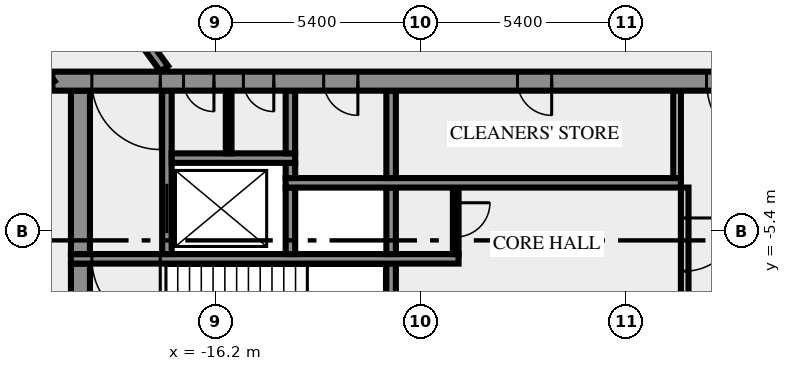
"""IFC4 building model, lengths in metres.
Left out: names, types, materials, properties, quantities, classifications, styles, units other than length and angle.
Written with IfcOpenShell. Run it as: python <this file> out.ifc"""

import sys

from ifc_helpers import new_model, si_unit, direction, frame, frame_2d, origin, place, context, subcontext, project, spatial, rectangle, extrude, element, fill, save


model = new_model("IFC4")
c1 = context("Model", 3, precision=1e-05, world=origin(), true_north=direction((0.0, 1.0)))
c2 = subcontext(c1, "Body", "Model", "MODEL_VIEW")
j1 = project(units=[si_unit("LENGTHUNIT", "METRE"), si_unit("PLANEANGLEUNIT", "RADIAN")], contexts=[c1])
p1 = place(None, origin())
s1 = spatial("IfcSite", under=j1, at=p1, CompositionType="ELEMENT")
p2 = place(p1, origin())
s2 = spatial("IfcBuilding", under=s1, at=p2, CompositionType="ELEMENT")
p3 = place(p2, frame((0.0, 0.0, 172.0)))
s3 = spatial("IfcBuildingStorey", under=s2, at=p3, CompositionType="ELEMENT", Elevation=172.0)
p4 = place(p3, frame((-19.75, -10.5, 0.0), z_axis=(0.0, 0.0, 1.0), x_axis=(0.0, 1.0, 0.0)))
e1 = element("IfcWall", 1, at=p4, inside=s3, PredefinedType="SHEAR", context=c2, shape_type="SweptSolid", body=[
    extrude(rectangle(XDim=4.25, YDim=0.5, at=frame_2d((2.125, 0.0))), origin(), (0.0, 0.0, 1.0), 3.65),
])
p5 = place(p3, frame((-11.575, -7.25, 0.0), z_axis=(0.0, 0.0, 1.0), x_axis=(0.0, 1.0, 0.0)))
e2 = element("IfcWall", 2, at=p5, inside=s3, PredefinedType="SHEAR", context=c2, shape_type="SweptSolid", body=[
    extrude(rectangle(XDim=1.0, YDim=0.25, at=frame_2d((0.5, 0.0))), origin(), (0.0, 0.0, 1.0), 3.65),
])
p6 = place(p3, frame((-3.85, -4.25, 0.0), z_axis=(0.0, 0.0, 1.0), x_axis=(0.0, -1.0, 0.0)))
e3 = element("IfcWall", 3, at=p6, inside=s3, PredefinedType="SOLIDWALL", context=c2, shape_type="SweptSolid", body=[
    extrude(rectangle(XDim=3.0, YDim=0.2, at=frame_2d((1.5, 0.0))), origin(), (0.0, 0.0, 1.0), 3.65),
])
p7 = place(p6, frame((0.8, 0.0, 0.0)))
e4 = element("IfcOpeningElement", 4, at=p7, cuts=e3, PredefinedType="OPENING", context=c2, shape_type="SweptSolid", body=[
    extrude(rectangle(XDim=1.4, YDim=2.1, at=frame_2d((0.7, 1.05))), frame((0.0, 0.11, 0.0), z_axis=(0.0, -1.0, 0.0), x_axis=(1.0, 0.0, 0.0)), (0.0, 0.0, 1.0), 0.22),
])
p8 = place(p3, frame((-9.8, -6.125, 0.0), z_axis=(0.0, 0.0, 1.0), x_axis=(-1.0, 0.0, 0.0)))
e5 = element("IfcWall", 5, at=p8, inside=s3, PredefinedType="SHEAR", context=c2, shape_type="SweptSolid", body=[
    extrude(rectangle(XDim=10.2, YDim=0.25, at=frame_2d((5.1, 0.0))), origin(), (0.0, 0.0, 1.0), 3.65),
])
p9 = place(p8, frame((7.85, 0.0, 0.0)))
e6 = element("IfcOpeningElement", 6, at=p9, cuts=e5, PredefinedType="OPENING", context=c2, shape_type="SweptSolid", body=[
    extrude(rectangle(XDim=1.8, YDim=2.1, at=frame_2d((0.9, 1.05))), frame((0.0, 0.135, 0.0), z_axis=(0.0, -1.0, 0.0), x_axis=(1.0, 0.0, 0.0)), (0.0, 0.0, 1.0), 0.27),
])
p10 = place(p3, frame((-19.75, -6.0, 0.0), z_axis=(0.0, 0.0, 1.0), x_axis=(0.0, 1.0, 0.0)))
e7 = element("IfcWall", 7, at=p10, inside=s3, PredefinedType="SHEAR", context=c2, shape_type="SweptSolid", body=[
    extrude(rectangle(XDim=4.3, YDim=0.5, at=frame_2d((2.15, 0.0))), origin(), (0.0, 0.0, 1.0), 3.65),
])
p11 = place(p3, frame((-17.475, -6.0, 0.0), z_axis=(0.0, 0.0, 1.0), x_axis=(0.0, 1.0, 0.0)))
e8 = element("IfcWall", 8, at=p11, inside=s3, PredefinedType="SHEAR", context=c2, shape_type="SweptSolid", body=[
    extrude(rectangle(XDim=4.3, YDim=0.25, at=frame_2d((2.15, 0.0))), origin(), (0.0, 0.0, 1.0), 3.65),
])
p12 = place(p11, frame((0.55, 0.0, 0.0)))
e9 = element("IfcOpeningElement", 9, at=p12, cuts=e8, PredefinedType="OPENING", context=c2, shape_type="SweptSolid", body=[
    extrude(rectangle(XDim=1.3, YDim=2.1, at=frame_2d((0.65, 1.05))), frame((0.0, 0.135, 0.0), z_axis=(0.0, -1.0, 0.0), x_axis=(1.0, 0.0, 0.0)), (0.0, 0.0, 1.0), 0.27),
])
for number, where, z_axis, x_axis in (
    (10, (-14.225, -6.0, 0.0), (0.0, 0.0, 1.0), (0.0, 1.0, 0.0)),
    (11, (-11.575, -6.0, 0.0), (0.0, 0.0, 1.0), (0.0, 1.0, 0.0)),
):
    element("IfcWall", number, at=place(p3, frame(where, z_axis=z_axis, x_axis=x_axis)), inside=s3, PredefinedType="SHEAR", context=c2, shape_type="SweptSolid", body=[
        extrude(rectangle(XDim=1.75, YDim=0.25, at=frame_2d((0.875, 0.0))), origin(), (0.0, 0.0, 1.0), 3.65),
    ])
p13 = place(p3, frame((-9.875, -4.25, 0.0), z_axis=(0.0, 0.0, 1.0), x_axis=(0.0, -1.0, 0.0)))
e12 = element("IfcWall", 12, at=p13, inside=s3, PredefinedType="PARTITIONING", context=c2, shape_type="SweptSolid", body=[
    extrude(rectangle(XDim=1.75, YDim=0.15, at=frame_2d((0.875, 0.0))), origin(), (0.0, 0.0, 1.0), 3.65),
])
p14 = place(p13, frame((0.4, 0.0, 0.0)))
e13 = element("IfcOpeningElement", 13, at=p14, cuts=e12, PredefinedType="OPENING", context=c2, shape_type="SweptSolid", body=[
    extrude(rectangle(XDim=0.9, YDim=2.1, at=frame_2d((0.45, 1.05))), frame((0.0, 0.085, 0.0), z_axis=(0.0, -1.0, 0.0), x_axis=(1.0, 0.0, 0.0)), (0.0, 0.0, 1.0), 0.17),
])
p15 = place(p3, frame((-14.35, -4.125, 0.0), z_axis=(0.0, 0.0, 1.0), x_axis=(1.0, 0.0, 0.0)))
e14 = element("IfcWall", 14, at=p15, inside=s3, PredefinedType="SHEAR", context=c2, shape_type="SweptSolid", body=[
    extrude(rectangle(XDim=10.4, YDim=0.25, at=frame_2d((5.2, 0.0))), origin(), (0.0, 0.0, 1.0), 3.65),
])
p16 = place(p3, frame((-14.225, -4.0, 0.0), z_axis=(0.0, 0.0, 1.0), x_axis=(0.0, 1.0, 0.0)))
e15 = element("IfcWall", 15, at=p16, inside=s3, PredefinedType="SHEAR", context=c2, shape_type="SweptSolid", body=[
    extrude(rectangle(XDim=0.4, YDim=0.25, at=frame_2d((0.2, 0.0))), origin(), (0.0, 0.0, 1.0), 3.65),
])
p17 = place(p3, frame((-11.575, -4.0, 0.0), z_axis=(0.0, 0.0, 1.0), x_axis=(0.0, 1.0, 0.0)))
e16 = element("IfcWall", 16, at=p17, inside=s3, PredefinedType="SHEAR", context=c2, shape_type="SweptSolid", body=[
    extrude(rectangle(XDim=2.3, YDim=0.25, at=frame_2d((1.15, 0.0))), origin(), (0.0, 0.0, 1.0), 3.65),
])
p18 = place(p3, frame((-4.05, -4.0, 0.0), z_axis=(0.0, 0.0, 1.0), x_axis=(0.0, 1.0, 0.0)))
e17 = element("IfcWall", 17, at=p18, inside=s3, PredefinedType="SOLIDWALL", context=c2, shape_type="SweptSolid", body=[
    extrude(rectangle(XDim=2.3, YDim=0.2, at=frame_2d((1.15, 0.0))), origin(), (0.0, 0.0, 1.0), 3.65),
])
p19 = place(p3, frame((-17.35, -3.475, 0.0), z_axis=(0.0, 0.0, 1.0), x_axis=(1.0, 0.0, 0.0)))
e18 = element("IfcWall", 18, at=p19, inside=s3, PredefinedType="SHEAR", context=c2, shape_type="SweptSolid", body=[
    extrude(rectangle(XDim=3.25, YDim=0.25, at=frame_2d((1.625, 0.0))), origin(), (0.0, 0.0, 1.0), 3.65),
])
p20 = place(p3, frame((-15.85, -3.35, 0.0), z_axis=(0.0, 0.0, 1.0), x_axis=(0.0, 1.0, 0.0)))
e19 = element("IfcWall", 19, at=p20, inside=s3, PredefinedType="PARTITIONING", context=c2, shape_type="SweptSolid", body=[
    extrude(rectangle(XDim=1.65, YDim=0.15, at=frame_2d((0.825, 0.0))), origin(), (0.0, 0.0, 1.0), 3.65),
])
p21 = place(p3, frame((-14.225, -3.35, 0.0), z_axis=(0.0, 0.0, 1.0), x_axis=(0.0, 1.0, 0.0)))
e20 = element("IfcWall", 20, at=p21, inside=s3, PredefinedType="SHEAR", context=c2, shape_type="SweptSolid", body=[
    extrude(rectangle(XDim=1.65, YDim=0.25, at=frame_2d((0.825, 0.0))), origin(), (0.0, 0.0, 1.0), 3.65),
])
p22 = place(p3, frame((20.49, -1.45, 0.0), z_axis=(0.0, 0.0, 1.0), x_axis=(-1.0, 0.0, 0.0)))
e21 = element("IfcWall", 21, at=p22, inside=s3, PredefinedType="SHEAR", context=c2, shape_type="SweptSolid", body=[
    extrude(rectangle(XDim=40.98, YDim=0.5, at=frame_2d((20.49, 0.0))), origin(), (0.0, 0.0, 1.0), 3.65),
])
p23 = place(p22, frame((38.14, 0.0, 0.0)))
e22 = element("IfcOpeningElement", 22, at=p23, cuts=e21, PredefinedType="OPENING", context=c2, shape_type="SweptSolid", body=[
    extrude(rectangle(XDim=1.8, YDim=2.1, at=frame_2d((0.9, 1.05))), frame((0.0, 0.26, 0.0), z_axis=(0.0, -1.0, 0.0), x_axis=(1.0, 0.0, 0.0)), (0.0, 0.0, 1.0), 0.52),
])
p24 = place(p22, frame((36.728, 0.0, 0.0)))
e23 = element("IfcOpeningElement", 23, at=p24, cuts=e21, PredefinedType="OPENING", context=c2, shape_type="SweptSolid", body=[
    extrude(rectangle(XDim=0.8, YDim=2.1, at=frame_2d((0.4, 1.05))), frame((0.0, 0.26, 0.0), z_axis=(0.0, -1.0, 0.0), x_axis=(1.0, 0.0, 0.0)), (0.0, 0.0, 1.0), 0.52),
])
p25 = place(p22, frame((35.153, 0.0, 0.0)))
e24 = element("IfcOpeningElement", 24, at=p25, cuts=e21, PredefinedType="OPENING", context=c2, shape_type="SweptSolid", body=[
    extrude(rectangle(XDim=0.8, YDim=2.1, at=frame_2d((0.4, 1.05))), frame((0.0, 0.26, 0.0), z_axis=(0.0, -1.0, 0.0), x_axis=(1.0, 0.0, 0.0)), (0.0, 0.0, 1.0), 0.52),
])
p26 = place(p22, frame((32.94, 0.0, 0.0)))
e25 = element("IfcOpeningElement", 25, at=p26, cuts=e21, PredefinedType="OPENING", context=c2, shape_type="SweptSolid", body=[
    extrude(rectangle(XDim=0.9, YDim=2.1, at=frame_2d((0.45, 1.05))), frame((0.0, 0.26, 0.0), z_axis=(0.0, -1.0, 0.0), x_axis=(1.0, 0.0, 0.0)), (0.0, 0.0, 1.0), 0.52),
])
p27 = place(p22, frame((27.84, 0.0, 0.0)))
e26 = element("IfcOpeningElement", 26, at=p27, cuts=e21, PredefinedType="OPENING", context=c2, shape_type="SweptSolid", body=[
    extrude(rectangle(XDim=0.9, YDim=2.1, at=frame_2d((0.45, 1.05))), frame((0.0, 0.26, 0.0), z_axis=(0.0, -1.0, 0.0), x_axis=(1.0, 0.0, 0.0)), (0.0, 0.0, 1.0), 0.52),
])
p28 = place(p22, frame((21.765, 0.0, 0.0)))
e27 = element("IfcOpeningElement", 27, at=p28, cuts=e21, PredefinedType="OPENING", context=c2, shape_type="SweptSolid", body=[
    extrude(rectangle(XDim=2.0, YDim=2.1, at=frame_2d((1.0, 1.05))), frame((0.0, 0.26, 0.0), z_axis=(0.0, -1.0, 0.0), x_axis=(1.0, 0.0, 0.0)), (0.0, 0.0, 1.0), 0.52),
])
p29 = place(p22, frame((7.14, 0.0, 0.0)))
e28 = element("IfcOpeningElement", 28, at=p29, cuts=e21, PredefinedType="OPENING", context=c2, shape_type="SweptSolid", body=[
    extrude(rectangle(XDim=0.9, YDim=2.1, at=frame_2d((0.45, 1.05))), frame((0.0, 0.26, 0.0), z_axis=(0.0, -1.0, 0.0), x_axis=(1.0, 0.0, 0.0)), (0.0, 0.0, 1.0), 0.52),
])
p30 = place(p22, frame((4.19, 0.0, 0.0)))
e29 = element("IfcOpeningElement", 29, at=p30, cuts=e21, PredefinedType="OPENING", context=c2, shape_type="SweptSolid", body=[
    extrude(rectangle(XDim=0.9, YDim=2.1, at=frame_2d((0.45, 1.05))), frame((0.0, 0.26, 0.0), z_axis=(0.0, -1.0, 0.0), x_axis=(1.0, 0.0, 0.0)), (0.0, 0.0, 1.0), 0.52),
])
p31 = place(p22, frame((1.04, 0.0, 0.0)))
e30 = element("IfcOpeningElement", 30, at=p31, cuts=e21, PredefinedType="OPENING", context=c2, shape_type="SweptSolid", body=[
    extrude(rectangle(XDim=1.8, YDim=2.1, at=frame_2d((0.9, 1.05))), frame((0.0, 0.26, 0.0), z_axis=(0.0, -1.0, 0.0), x_axis=(1.0, 0.0, 0.0)), (0.0, 0.0, 1.0), 0.52),
])
p32 = place(p3, frame((-20.531, -1.523, 0.0), z_axis=(0.0, 0.0, 1.0), x_axis=(-0.587784239999, 0.809017729849, 0.0)))
e31 = element("IfcWall", 31, at=p32, inside=s3, PredefinedType="SOLIDWALL", context=c2, shape_type="SweptSolid", body=[
    extrude(rectangle(XDim=23.271, YDim=0.25, at=frame_2d((11.635, 0.0))), origin(), (0.0, 0.0, 1.0), 3.65),
])
p33 = place(p32, frame((18.366, 0.0, 0.0)))
e32 = element("IfcOpeningElement", 32, at=p33, cuts=e31, PredefinedType="OPENING", context=c2, shape_type="SweptSolid", body=[
    extrude(rectangle(XDim=0.9, YDim=2.1, at=frame_2d((0.45, 1.05))), frame((0.0, 0.135, 0.0), z_axis=(0.0, -1.0, 0.0), x_axis=(1.0, 0.0, 0.0)), (0.0, 0.0, 1.0), 0.27),
])
p34 = place(p32, frame((10.266, 0.0, 0.0)))
e33 = element("IfcOpeningElement", 33, at=p34, cuts=e31, PredefinedType="OPENING", context=c2, shape_type="SweptSolid", body=[
    extrude(rectangle(XDim=0.9, YDim=2.1, at=frame_2d((0.45, 1.05))), frame((0.0, 0.135, 0.0), z_axis=(0.0, -1.0, 0.0), x_axis=(1.0, 0.0, 0.0)), (0.0, 0.0, 1.0), 0.27),
])
p35 = place(p32, frame((21.896, 0.0, 0.0)))
e34 = element("IfcOpeningElement", 34, at=p35, cuts=e31, PredefinedType="OPENING", context=c2, shape_type="SweptSolid", body=[
    extrude(rectangle(XDim=0.9, YDim=2.1, at=frame_2d((0.45, 1.05))), frame((0.0, 0.135, 0.0), z_axis=(0.0, -1.0, 0.0), x_axis=(1.0, 0.0, 0.0)), (0.0, 0.0, 1.0), 0.27),
])
p36 = place(p32, frame((12.966, 0.0, 0.0)))
e35 = element("IfcOpeningElement", 35, at=p36, cuts=e31, PredefinedType="OPENING", context=c2, shape_type="SweptSolid", body=[
    extrude(rectangle(XDim=0.9, YDim=2.1, at=frame_2d((0.45, 1.05))), frame((0.0, 0.135, 0.0), z_axis=(0.0, -1.0, 0.0), x_axis=(1.0, 0.0, 0.0)), (0.0, 0.0, 1.0), 0.27),
])
p37 = place(p3, frame((-31.918, 18.658, 0.0), z_axis=(0.0, 0.0, 1.0), x_axis=(0.587788731405, -0.80901446664, 0.0)))
e36 = element("IfcWall", 36, at=p37, inside=s3, PredefinedType="SOLIDWALL", context=c2, shape_type="SweptSolid", body=[
    extrude(rectangle(XDim=24.453, YDim=0.25, at=frame_2d((12.227, 0.0))), origin(), (0.0, 0.0, 1.0), 3.65),
])
p38 = place(p37, frame((0.224, 0.0, 0.0)))
e37 = element("IfcOpeningElement", 37, at=p38, cuts=e36, PredefinedType="OPENING", context=c2, shape_type="SweptSolid", body=[
    extrude(rectangle(XDim=0.9, YDim=2.1, at=frame_2d((0.45, 1.05))), frame((0.0, 0.135, 0.0), z_axis=(0.0, -1.0, 0.0), x_axis=(1.0, 0.0, 0.0)), (0.0, 0.0, 1.0), 0.27),
])
p39 = place(p7, origin())
e38 = element("IfcDoor", 38, at=p39, inside=s3, OperationType="DOUBLE_DOOR_SINGLE_SWING", PredefinedType="DOOR", context=c2, shape_type="SweptSolid", body=[
    extrude(rectangle(XDim=1.4, YDim=2.1, at=frame_2d((0.7, 1.05))), frame((0.0, 0.025, 0.0), z_axis=(0.0, -1.0, 0.0), x_axis=(1.0, 0.0, 0.0)), (0.0, 0.0, 1.0), 0.05),
])
fill(e4, e38)
p40 = place(p9, origin())
e39 = element("IfcDoor", 39, at=p40, inside=s3, OperationType="DOUBLE_DOOR_SINGLE_SWING", PredefinedType="DOOR", context=c2, shape_type="SweptSolid", body=[
    extrude(rectangle(XDim=1.8, YDim=2.1, at=frame_2d((0.9, 1.05))), frame((0.0, 0.025, 0.0), z_axis=(0.0, -1.0, 0.0), x_axis=(1.0, 0.0, 0.0)), (0.0, 0.0, 1.0), 0.05),
])
fill(e6, e39)
p41 = place(p12, origin())
e40 = element("IfcDoor", 40, at=p41, inside=s3, OperationType="DOUBLE_DOOR_SLIDING", PredefinedType="DOOR", context=c2, shape_type="SweptSolid", body=[
    extrude(rectangle(XDim=1.3, YDim=2.1, at=frame_2d((0.65, 1.05))), frame((0.0, 0.025, 0.0), z_axis=(0.0, -1.0, 0.0), x_axis=(1.0, 0.0, 0.0)), (0.0, 0.0, 1.0), 0.05),
])
fill(e9, e40)
p42 = place(p14, origin())
e41 = element("IfcDoor", 41, at=p42, inside=s3, OperationType="SINGLE_SWING_LEFT", PredefinedType="DOOR", context=c2, shape_type="SweptSolid", body=[
    extrude(rectangle(XDim=0.9, YDim=2.1, at=frame_2d((0.45, 1.05))), frame((0.0, 0.025, 0.0), z_axis=(0.0, -1.0, 0.0), x_axis=(1.0, 0.0, 0.0)), (0.0, 0.0, 1.0), 0.05),
])
fill(e13, e41)
p43 = place(p23, origin())
e42 = element("IfcDoor", 42, at=p43, inside=s3, OperationType="DOUBLE_DOOR_SINGLE_SWING", PredefinedType="DOOR", context=c2, shape_type="SweptSolid", body=[
    extrude(rectangle(XDim=1.8, YDim=2.1, at=frame_2d((0.9, 1.05))), frame((0.0, 0.025, 0.0), z_axis=(0.0, -1.0, 0.0), x_axis=(1.0, 0.0, 0.0)), (0.0, 0.0, 1.0), 0.05),
])
fill(e22, e42)
p44 = place(p24, origin())
e43 = element("IfcDoor", 43, at=p44, inside=s3, OperationType="SINGLE_SWING_RIGHT", PredefinedType="DOOR", context=c2, shape_type="SweptSolid", body=[
    extrude(rectangle(XDim=0.8, YDim=2.1, at=frame_2d((0.4, 1.05))), frame((0.0, 0.025, 0.0), z_axis=(0.0, -1.0, 0.0), x_axis=(1.0, 0.0, 0.0)), (0.0, 0.0, 1.0), 0.05),
])
fill(e23, e43)
p45 = place(p25, origin())
e44 = element("IfcDoor", 44, at=p45, inside=s3, OperationType="SINGLE_SWING_RIGHT", PredefinedType="DOOR", context=c2, shape_type="SweptSolid", body=[
    extrude(rectangle(XDim=0.8, YDim=2.1, at=frame_2d((0.4, 1.05))), frame((0.0, 0.025, 0.0), z_axis=(0.0, -1.0, 0.0), x_axis=(1.0, 0.0, 0.0)), (0.0, 0.0, 1.0), 0.05),
])
fill(e24, e44)
p46 = place(p26, origin())
e45 = element("IfcDoor", 45, at=p46, inside=s3, OperationType="SINGLE_SWING_RIGHT", PredefinedType="DOOR", context=c2, shape_type="SweptSolid", body=[
    extrude(rectangle(XDim=0.9, YDim=2.1, at=frame_2d((0.45, 1.05))), frame((0.0, 0.025, 0.0), z_axis=(0.0, -1.0, 0.0), x_axis=(1.0, 0.0, 0.0)), (0.0, 0.0, 1.0), 0.05),
])
fill(e25, e45)
p47 = place(p27, origin())
e46 = element("IfcDoor", 46, at=p47, inside=s3, OperationType="SINGLE_SWING_RIGHT", PredefinedType="DOOR", context=c2, shape_type="SweptSolid", body=[
    extrude(rectangle(XDim=0.9, YDim=2.1, at=frame_2d((0.45, 1.05))), frame((0.0, 0.025, 0.0), z_axis=(0.0, -1.0, 0.0), x_axis=(1.0, 0.0, 0.0)), (0.0, 0.0, 1.0), 0.05),
])
fill(e26, e46)
p48 = place(p28, origin())
e47 = element("IfcDoor", 47, at=p48, inside=s3, OperationType="DOUBLE_DOOR_SINGLE_SWING", PredefinedType="DOOR", context=c2, shape_type="SweptSolid", body=[
    extrude(rectangle(XDim=2.0, YDim=2.1, at=frame_2d((1.0, 1.05))), frame((0.0, 0.025, 0.0), z_axis=(0.0, -1.0, 0.0), x_axis=(1.0, 0.0, 0.0)), (0.0, 0.0, 1.0), 0.05),
])
fill(e27, e47)
save(model, sys.argv[1])
